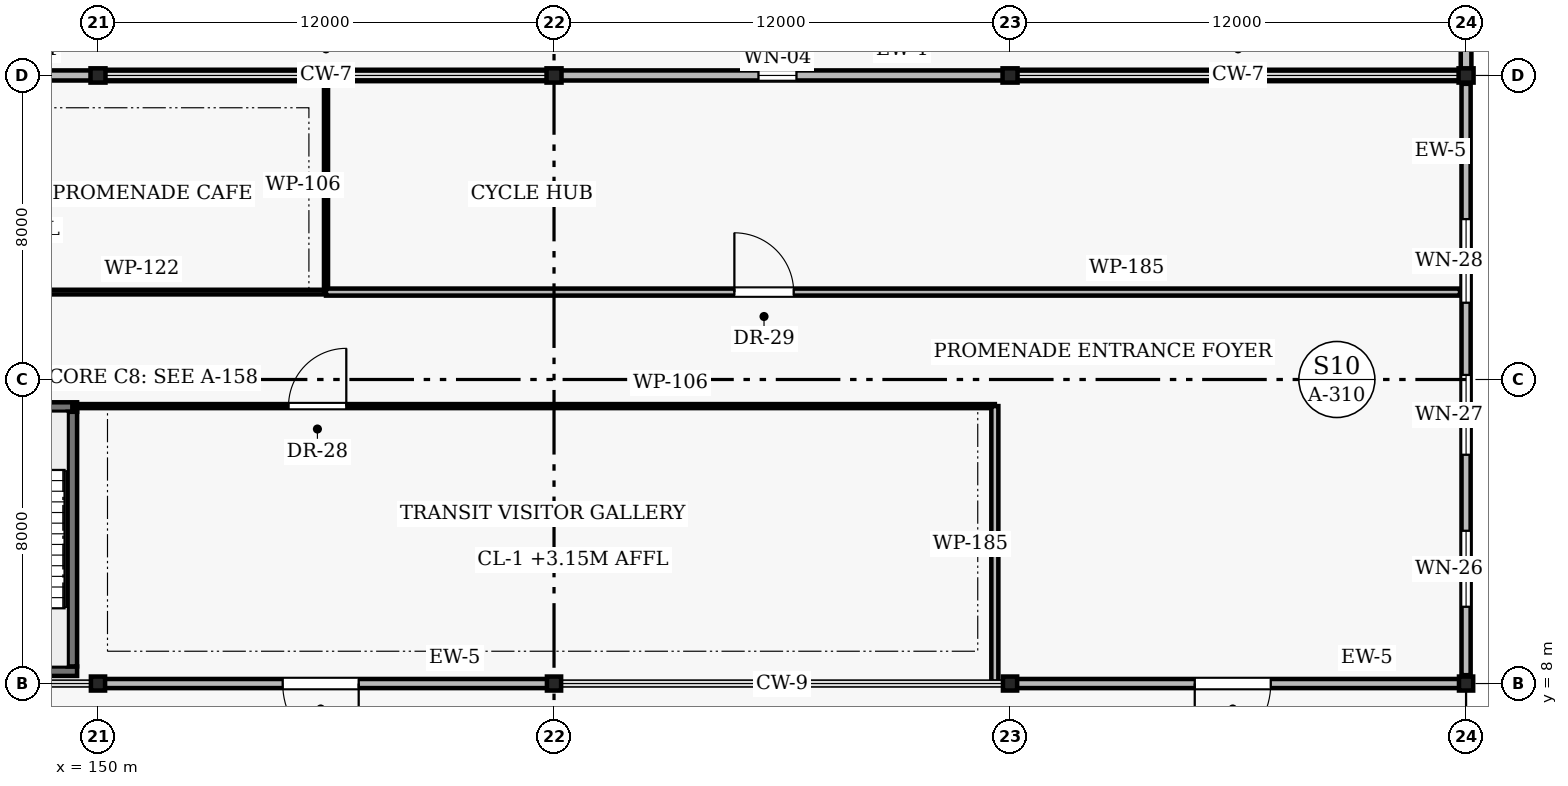
"""IFC4 building model, lengths in metres.
Left out: names, types, materials, properties, quantities, classifications, styles, units other than length and angle.
Written with IfcOpenShell. Run it as: python <this file> out.ifc"""

import sys

from ifc_helpers import new_model, si_unit, direction, frame, frame_2d, origin, origin_2d, place, context, subcontext, project, spatial, rectangle, i_section, extrude, element, fill, save


model = new_model("IFC4")
c1 = context("Model", 3, precision=1e-05, world=origin(), true_north=direction((0.0, 1.0)))
c2 = subcontext(c1, "Body", "Model", "MODEL_VIEW")
j1 = project(units=[si_unit("LENGTHUNIT", "METRE"), si_unit("PLANEANGLEUNIT", "RADIAN")], contexts=[c1])
p1 = place(None, origin())
s1 = spatial("IfcSite", under=j1, at=p1, CompositionType="ELEMENT")
p2 = place(p1, origin())
s2 = spatial("IfcBuilding", under=s1, at=p2, CompositionType="ELEMENT")
p3 = place(p2, origin())
s3 = spatial("IfcBuildingStorey", under=s2, at=p3, CompositionType="ELEMENT", Elevation=0.0)
p4 = place(p3, frame((150.0, 8.0, 0.0), z_axis=(0.0, 0.0, 1.0), x_axis=(1.0, 0.0, 0.0)))
e1 = element("IfcColumn", 1, at=p4, inside=s3, PredefinedType="COLUMN", context=c2, shape_type="SweptSolid", body=[
    extrude(i_section(OverallWidth=0.373, OverallDepth=0.368, WebThickness=0.015, FlangeThickness=0.024, FilletRadius=0.015, at=origin_2d()), origin(), (0.0, 0.0, 1.0), 4.5),
])
p5 = place(p3, frame((150.0, 24.0, 0.0), z_axis=(0.0, 0.0, 1.0), x_axis=(1.0, 0.0, 0.0)))
e2 = element("IfcColumn", 2, at=p5, inside=s3, PredefinedType="COLUMN", context=c2, shape_type="SweptSolid", body=[
    extrude(i_section(OverallWidth=0.394, OverallDepth=0.375, WebThickness=0.021, FlangeThickness=0.033, FilletRadius=0.018, at=origin_2d()), origin(), (0.0, 0.0, 1.0), 4.5),
])
p6 = place(p3, frame((162.0, 8.0, 0.0), z_axis=(0.0, 0.0, 1.0), x_axis=(1.0, 0.0, 0.0)))
e3 = element("IfcColumn", 3, at=p6, inside=s3, PredefinedType="COLUMN", context=c2, shape_type="SweptSolid", body=[
    extrude(i_section(OverallWidth=0.373, OverallDepth=0.368, WebThickness=0.015, FlangeThickness=0.024, FilletRadius=0.015, at=origin_2d()), origin(), (0.0, 0.0, 1.0), 4.5),
])
p7 = place(p3, frame((162.0, 24.0, 0.0), z_axis=(0.0, 0.0, 1.0), x_axis=(1.0, 0.0, 0.0)))
e4 = element("IfcColumn", 4, at=p7, inside=s3, PredefinedType="COLUMN", context=c2, shape_type="SweptSolid", body=[
    extrude(i_section(OverallWidth=0.394, OverallDepth=0.375, WebThickness=0.021, FlangeThickness=0.033, FilletRadius=0.018, at=origin_2d()), origin(), (0.0, 0.0, 1.0), 4.5),
])
p8 = place(p3, frame((174.0, 8.0, 0.0), z_axis=(0.0, 0.0, 1.0), x_axis=(1.0, 0.0, 0.0)))
e5 = element("IfcColumn", 5, at=p8, inside=s3, PredefinedType="COLUMN", context=c2, shape_type="SweptSolid", body=[
    extrude(i_section(OverallWidth=0.373, OverallDepth=0.368, WebThickness=0.015, FlangeThickness=0.024, FilletRadius=0.015, at=origin_2d()), origin(), (0.0, 0.0, 1.0), 4.5),
])
p9 = place(p3, frame((174.0, 24.0, 0.0), z_axis=(0.0, 0.0, 1.0), x_axis=(1.0, 0.0, 0.0)))
e6 = element("IfcColumn", 6, at=p9, inside=s3, PredefinedType="COLUMN", context=c2, shape_type="SweptSolid", body=[
    extrude(i_section(OverallWidth=0.394, OverallDepth=0.375, WebThickness=0.021, FlangeThickness=0.033, FilletRadius=0.018, at=origin_2d()), origin(), (0.0, 0.0, 1.0), 4.5),
])
p10 = place(p3, frame((186.0, 8.0, 0.0), z_axis=(0.0, 0.0, 1.0), x_axis=(1.0, 0.0, 0.0)))
e7 = element("IfcColumn", 7, at=p10, inside=s3, PredefinedType="COLUMN", context=c2, shape_type="SweptSolid", body=[
    extrude(i_section(OverallWidth=0.373, OverallDepth=0.368, WebThickness=0.015, FlangeThickness=0.024, FilletRadius=0.015, at=origin_2d()), origin(), (0.0, 0.0, 1.0), 4.5),
])
p11 = place(p3, frame((186.0, 24.0, 0.0), z_axis=(0.0, 0.0, 1.0), x_axis=(1.0, 0.0, 0.0)))
e8 = element("IfcColumn", 8, at=p11, inside=s3, PredefinedType="COLUMN", context=c2, shape_type="SweptSolid", body=[
    extrude(i_section(OverallWidth=0.394, OverallDepth=0.375, WebThickness=0.021, FlangeThickness=0.033, FilletRadius=0.018, at=origin_2d()), origin(), (0.0, 0.0, 1.0), 4.5),
])
p12 = place(p3, frame((142.58, 24.0, 0.0), z_axis=(0.0, 0.0, 1.0), x_axis=(1.0, 0.0, 0.0)))
e9 = element("IfcWall", 9, at=p12, inside=s3, PredefinedType="SOLIDWALL", context=c2, shape_type="SweptSolid", body=[
    extrude(rectangle(XDim=7.34, YDim=0.265, at=frame_2d((3.67, 0.0))), origin(), (0.0, 0.0, 1.0), 3.8),
])
p13 = place(p12, frame((3.05, 0.0, 1.2)))
e10 = element("IfcOpeningElement", 10, at=p13, cuts=e9, PredefinedType="OPENING", context=c2, shape_type="SweptSolid", body=[
    extrude(rectangle(XDim=1.0, YDim=1.2, at=frame_2d((0.5, 0.6))), frame((0.0, 0.142, 0.0), z_axis=(0.0, -1.0, 0.0), x_axis=(1.0, 0.0, 0.0)), (0.0, 0.0, 1.0), 0.285),
])
p14 = place(p3, frame((150.08, 24.0, 0.0), z_axis=(0.0, 0.0, 1.0), x_axis=(1.0, 0.0, 0.0)))
e11 = element("IfcWall", 11, at=p14, inside=s3, PredefinedType="SOLIDWALL", context=c2, shape_type="SweptSolid", body=[
    extrude(rectangle(XDim=11.84, YDim=0.3, at=frame_2d((5.92, 0.0))), origin(), (0.0, 0.0, 1.0), 1.1),
])
p15 = place(p3, frame((162.08, 24.0, 0.0), z_axis=(0.0, 0.0, 1.0), x_axis=(1.0, 0.0, 0.0)))
e12 = element("IfcWall", 12, at=p15, inside=s3, PredefinedType="SOLIDWALL", context=c2, shape_type="SweptSolid", body=[
    extrude(rectangle(XDim=11.84, YDim=0.265, at=frame_2d((5.92, 0.0))), origin(), (0.0, 0.0, 1.0), 3.8),
])
p16 = place(p15, frame((5.3, 0.0, 1.2)))
e13 = element("IfcOpeningElement", 13, at=p16, cuts=e12, PredefinedType="OPENING", context=c2, shape_type="SweptSolid", body=[
    extrude(rectangle(XDim=1.0, YDim=1.5, at=frame_2d((0.5, 0.75))), frame((0.0, 0.142, 0.0), z_axis=(0.0, -1.0, 0.0), x_axis=(1.0, 0.0, 0.0)), (0.0, 0.0, 1.0), 0.285),
])
p17 = place(p3, frame((174.08, 24.0, 0.0), z_axis=(0.0, 0.0, 1.0), x_axis=(1.0, 0.0, 0.0)))
e14 = element("IfcWall", 14, at=p17, inside=s3, PredefinedType="SOLIDWALL", context=c2, shape_type="SweptSolid", body=[
    extrude(rectangle(XDim=11.84, YDim=0.3, at=frame_2d((5.92, 0.0))), origin(), (0.0, 0.0, 1.0), 1.1),
])
p18 = place(p3, frame((186.0, 24.08, 0.0), z_axis=(0.0, 0.0, 1.0), x_axis=(0.0, 1.0, 0.0)))
e15 = element("IfcWall", 15, at=p18, inside=s3, PredefinedType="SOLIDWALL", context=c2, shape_type="SweptSolid", body=[
    extrude(rectangle(XDim=13.84, YDim=0.28, at=frame_2d((6.92, 0.0))), origin(), (0.0, 0.0, 1.0), 3.8),
])
p19 = place(p18, frame((4.8, 0.0, 0.0)))
e16 = element("IfcOpeningElement", 16, at=p19, cuts=e15, PredefinedType="OPENING", context=c2, shape_type="SweptSolid", body=[
    extrude(rectangle(XDim=3.4, YDim=3.25, at=frame_2d((1.7, 1.625))), frame((0.0, 0.15, 0.0), z_axis=(0.0, -1.0, 0.0), x_axis=(1.0, 0.0, 0.0)), (0.0, 0.0, 1.0), 0.3),
])
p20 = place(p3, frame((150.08, 8.0, 0.0), z_axis=(0.0, 0.0, 1.0), x_axis=(1.0, 0.0, 0.0)))
e17 = element("IfcWall", 17, at=p20, inside=s3, PredefinedType="SOLIDWALL", context=c2, shape_type="SweptSolid", body=[
    extrude(rectangle(XDim=11.84, YDim=0.24, at=frame_2d((5.92, 0.0))), origin(), (0.0, 0.0, 1.0), 3.75),
])
p21 = place(p20, frame((4.78, 0.0, 0.0)))
e18 = element("IfcOpeningElement", 18, at=p21, cuts=e17, PredefinedType="OPENING", context=c2, shape_type="SweptSolid", body=[
    extrude(rectangle(XDim=2.0, YDim=2.2, at=frame_2d((1.0, 1.1))), frame((0.0, 0.13, 0.0), z_axis=(0.0, -1.0, 0.0), x_axis=(1.0, 0.0, 0.0)), (0.0, 0.0, 1.0), 0.26),
])
p22 = place(p3, frame((174.08, 8.0, 0.0), z_axis=(0.0, 0.0, 1.0), x_axis=(1.0, 0.0, 0.0)))
e19 = element("IfcWall", 19, at=p22, inside=s3, PredefinedType="SOLIDWALL", context=c2, shape_type="SweptSolid", body=[
    extrude(rectangle(XDim=11.84, YDim=0.24, at=frame_2d((5.92, 0.0))), origin(), (0.0, 0.0, 1.0), 3.75),
])
p23 = place(p22, frame((4.78, 0.0, 0.0)))
e20 = element("IfcOpeningElement", 20, at=p23, cuts=e19, PredefinedType="OPENING", context=c2, shape_type="SweptSolid", body=[
    extrude(rectangle(XDim=2.0, YDim=2.2, at=frame_2d((1.0, 1.1))), frame((0.0, 0.13, 0.0), z_axis=(0.0, -1.0, 0.0), x_axis=(1.0, 0.0, 0.0)), (0.0, 0.0, 1.0), 0.26),
])
p24 = place(p3, frame((186.0, 8.22, 0.0), z_axis=(0.0, 0.0, 1.0), x_axis=(0.0, 1.0, 0.0)))
e21 = element("IfcWall", 21, at=p24, inside=s3, PredefinedType="SOLIDWALL", context=c2, shape_type="SweptSolid", body=[
    extrude(rectangle(XDim=15.56, YDim=0.24, at=frame_2d((7.78, 0.0))), origin(), (0.0, 0.0, 1.0), 3.581),
])
p25 = place(p24, frame((1.8, 0.0, 1.05)))
e22 = element("IfcOpeningElement", 22, at=p25, cuts=e21, PredefinedType="OPENING", context=c2, shape_type="SweptSolid", body=[
    extrude(rectangle(XDim=2.0, YDim=1.5, at=frame_2d((1.0, 0.75))), frame((0.0, 0.13, 0.0), z_axis=(0.0, -1.0, 0.0), x_axis=(1.0, 0.0, 0.0)), (0.0, 0.0, 1.0), 0.26),
])
p26 = place(p24, frame((5.8, 0.0, 1.05)))
e23 = element("IfcOpeningElement", 23, at=p26, cuts=e21, PredefinedType="OPENING", context=c2, shape_type="SweptSolid", body=[
    extrude(rectangle(XDim=2.1, YDim=1.5, at=frame_2d((1.05, 0.75))), frame((0.0, 0.13, 0.0), z_axis=(0.0, -1.0, 0.0), x_axis=(1.0, 0.0, 0.0)), (0.0, 0.0, 1.0), 0.26),
])
p27 = place(p24, frame((9.8, 0.0, 1.05)))
e24 = element("IfcOpeningElement", 24, at=p27, cuts=e21, PredefinedType="OPENING", context=c2, shape_type="SweptSolid", body=[
    extrude(rectangle(XDim=2.2, YDim=1.6, at=frame_2d((1.1, 0.8))), frame((0.0, 0.13, 0.0), z_axis=(0.0, -1.0, 0.0), x_axis=(1.0, 0.0, 0.0)), (0.0, 0.0, 1.0), 0.26),
])
p28 = place(p3, frame((143.05, 8.325, 0.0), z_axis=(0.0, 0.0, 1.0), x_axis=(1.0, 0.0, 0.0)))
e25 = element("IfcWall", 25, at=p28, inside=s3, PredefinedType="SHEAR", context=c2, shape_type="SweptSolid", body=[
    extrude(rectangle(XDim=6.4, YDim=0.25, at=frame_2d((3.2, 0.0))), origin(), (0.0, 0.0, 1.0), 4.5),
])
p29 = place(p3, frame((143.05, 15.275, 0.0), z_axis=(0.0, 0.0, 1.0), x_axis=(1.0, 0.0, 0.0)))
e26 = element("IfcWall", 26, at=p29, inside=s3, PredefinedType="SHEAR", context=c2, shape_type="SweptSolid", body=[
    extrude(rectangle(XDim=6.4, YDim=0.25, at=frame_2d((3.2, 0.0))), origin(), (0.0, 0.0, 1.0), 4.5),
])
p30 = place(p29, frame((0.8, 0.0, 0.0)))
e27 = element("IfcOpeningElement", 27, at=p30, cuts=e26, PredefinedType="OPENING", context=c2, shape_type="SweptSolid", body=[
    extrude(rectangle(XDim=1.1, YDim=2.15, at=frame_2d((0.55, 1.075))), frame((0.0, 0.135, 0.0), z_axis=(0.0, -1.0, 0.0), x_axis=(1.0, 0.0, 0.0)), (0.0, 0.0, 1.0), 0.27),
])
p31 = place(p29, frame((3.775, 0.0, 0.0)))
e28 = element("IfcOpeningElement", 28, at=p31, cuts=e26, PredefinedType="OPENING", context=c2, shape_type="SweptSolid", body=[
    extrude(rectangle(XDim=1.25, YDim=2.15, at=frame_2d((0.625, 1.075))), frame((0.0, 0.135, 0.0), z_axis=(0.0, -1.0, 0.0), x_axis=(1.0, 0.0, 0.0)), (0.0, 0.0, 1.0), 0.27),
])
p32 = place(p3, frame((149.325, 8.45, 0.0), z_axis=(0.0, 0.0, 1.0), x_axis=(0.0, 1.0, 0.0)))
e29 = element("IfcWall", 29, at=p32, inside=s3, PredefinedType="SHEAR", context=c2, shape_type="SweptSolid", body=[
    extrude(rectangle(XDim=6.7, YDim=0.25, at=frame_2d((3.35, 0.0))), origin(), (0.0, 0.0, 1.0), 4.5),
])
p33 = place(p3, frame((135.16, 18.3, 0.0), z_axis=(0.0, 0.0, 1.0), x_axis=(1.0, 0.0, 0.0)))
e30 = element("IfcWall", 30, at=p33, inside=s3, PredefinedType="PARTITIONING", context=c2, shape_type="SweptSolid", body=[
    extrude(rectangle(XDim=20.84, YDim=0.122, at=frame_2d((10.42, 0.0))), origin(), (0.0, 0.0, 1.0), 3.7),
])
p34 = place(p33, frame((9.69, 0.0, 0.0)))
e31 = element("IfcOpeningElement", 31, at=p34, cuts=e30, PredefinedType="OPENING", context=c2, shape_type="SweptSolid", body=[
    extrude(rectangle(XDim=1.46, YDim=2.2, at=frame_2d((0.73, 1.1))), frame((0.0, 0.071, 0.0), z_axis=(0.0, -1.0, 0.0), x_axis=(1.0, 0.0, 0.0)), (0.0, 0.0, 1.0), 0.142),
])
p35 = place(p3, frame((156.0, 18.3, 0.0), z_axis=(0.0, 0.0, 1.0), x_axis=(0.0, 1.0, 0.0)))
e32 = element("IfcWall", 32, at=p35, inside=s3, PredefinedType="PARTITIONING", context=c2, shape_type="SweptSolid", body=[
    extrude(rectangle(XDim=5.62, YDim=0.106, at=frame_2d((2.81, 0.0))), origin(), (0.0, 0.0, 1.0), 3.7),
])
p36 = place(p3, frame((149.325, 15.3, 0.0), z_axis=(0.0, 0.0, 1.0), x_axis=(1.0, 0.0, 0.0)))
e33 = element("IfcWall", 33, at=p36, inside=s3, PredefinedType="PARTITIONING", context=c2, shape_type="SweptSolid", body=[
    extrude(rectangle(XDim=24.275, YDim=0.106, at=frame_2d((12.138, 0.0))), origin(), (0.0, 0.0, 1.0), 3.7),
])
p37 = place(p36, frame((5.689, 0.0, 0.0)))
e34 = element("IfcOpeningElement", 34, at=p37, cuts=e33, PredefinedType="OPENING", context=c2, shape_type="SweptSolid", body=[
    extrude(rectangle(XDim=1.52, YDim=2.18, at=frame_2d((0.76, 1.09))), frame((0.0, 0.063, 0.0), z_axis=(0.0, -1.0, 0.0), x_axis=(1.0, 0.0, 0.0)), (0.0, 0.0, 1.0), 0.126),
])
p38 = place(p3, frame((173.6, 8.05, 0.0), z_axis=(0.0, 0.0, 1.0), x_axis=(0.0, 1.0, 0.0)))
e35 = element("IfcWall", 35, at=p38, inside=s3, PredefinedType="PARTITIONING", context=c2, shape_type="SweptSolid", body=[
    extrude(rectangle(XDim=7.25, YDim=0.185, at=frame_2d((3.625, 0.0))), origin(), (0.0, 0.0, 1.0), 3.581),
])
p39 = place(p3, frame((156.0, 18.3, 0.0), z_axis=(0.0, 0.0, 1.0), x_axis=(1.0, 0.0, 0.0)))
e36 = element("IfcWall", 36, at=p39, inside=s3, PredefinedType="PARTITIONING", context=c2, shape_type="SweptSolid", body=[
    extrude(rectangle(XDim=29.84, YDim=0.185, at=frame_2d((14.92, 0.0))), origin(), (0.0, 0.0, 1.0), 3.7),
])
p40 = place(p39, frame((10.746, 0.0, 0.0)))
e37 = element("IfcOpeningElement", 37, at=p40, cuts=e36, PredefinedType="OPENING", context=c2, shape_type="SweptSolid", body=[
    extrude(rectangle(XDim=1.56, YDim=2.2, at=frame_2d((0.78, 1.1))), frame((0.0, 0.103, 0.0), z_axis=(0.0, -1.0, 0.0), x_axis=(1.0, 0.0, 0.0)), (0.0, 0.0, 1.0), 0.205),
])
p41 = place(p16, origin())
e38 = element("IfcWindow", 38, at=p41, inside=s3, PartitioningType="SINGLE_PANEL", PredefinedType="WINDOW", context=c2, shape_type="SweptSolid", body=[
    extrude(rectangle(XDim=1.0, YDim=1.5, at=frame_2d((0.5, 0.75))), frame((0.0, 0.03, 0.0), z_axis=(0.0, -1.0, 0.0), x_axis=(1.0, 0.0, 0.0)), (0.0, 0.0, 1.0), 0.06),
])
fill(e13, e38)
p42 = place(p21, frame((2.0, 0.0, 0.0), z_axis=(0.0, 0.0, 1.0), x_axis=(-1.0, 0.0, 0.0)))
e39 = element("IfcDoor", 39, at=p42, inside=s3, OperationType="SINGLE_SWING_LEFT", PredefinedType="DOOR", context=c2, shape_type="SweptSolid", body=[
    extrude(rectangle(XDim=2.0, YDim=2.2, at=frame_2d((1.0, 1.1))), frame((0.0, 0.025, 0.0), z_axis=(0.0, -1.0, 0.0), x_axis=(1.0, 0.0, 0.0)), (0.0, 0.0, 1.0), 0.05),
])
fill(e18, e39)
p43 = place(p23, frame((2.0, 0.0, 0.0), z_axis=(0.0, 0.0, 1.0), x_axis=(-1.0, 0.0, 0.0)))
e40 = element("IfcDoor", 40, at=p43, inside=s3, OperationType="SINGLE_SWING_RIGHT", PredefinedType="DOOR", context=c2, shape_type="SweptSolid", body=[
    extrude(rectangle(XDim=2.0, YDim=2.2, at=frame_2d((1.0, 1.1))), frame((0.0, 0.025, 0.0), z_axis=(0.0, -1.0, 0.0), x_axis=(1.0, 0.0, 0.0)), (0.0, 0.0, 1.0), 0.05),
])
fill(e20, e40)
p44 = place(p25, origin())
e41 = element("IfcWindow", 41, at=p44, inside=s3, PartitioningType="SINGLE_PANEL", PredefinedType="WINDOW", context=c2, shape_type="SweptSolid", body=[
    extrude(rectangle(XDim=2.0, YDim=1.5, at=frame_2d((1.0, 0.75))), frame((0.0, 0.03, 0.0), z_axis=(0.0, -1.0, 0.0), x_axis=(1.0, 0.0, 0.0)), (0.0, 0.0, 1.0), 0.06),
])
fill(e22, e41)
p45 = place(p26, origin())
e42 = element("IfcWindow", 42, at=p45, inside=s3, PartitioningType="SINGLE_PANEL", PredefinedType="WINDOW", context=c2, shape_type="SweptSolid", body=[
    extrude(rectangle(XDim=2.1, YDim=1.5, at=frame_2d((1.05, 0.75))), frame((0.0, 0.03, 0.0), z_axis=(0.0, -1.0, 0.0), x_axis=(1.0, 0.0, 0.0)), (0.0, 0.0, 1.0), 0.06),
])
fill(e23, e42)
p46 = place(p27, origin())
e43 = element("IfcWindow", 43, at=p46, inside=s3, PartitioningType="SINGLE_PANEL", PredefinedType="WINDOW", context=c2, shape_type="SweptSolid", body=[
    extrude(rectangle(XDim=2.2, YDim=1.6, at=frame_2d((1.1, 0.8))), frame((0.0, 0.03, 0.0), z_axis=(0.0, -1.0, 0.0), x_axis=(1.0, 0.0, 0.0)), (0.0, 0.0, 1.0), 0.06),
])
fill(e24, e43)
p47 = place(p37, origin())
e44 = element("IfcDoor", 44, at=p47, inside=s3, OperationType="SINGLE_SWING_RIGHT", PredefinedType="DOOR", context=c2, shape_type="SweptSolid", body=[
    extrude(rectangle(XDim=1.52, YDim=2.18, at=frame_2d((0.76, 1.09))), frame((0.0, 0.025, 0.0), z_axis=(0.0, -1.0, 0.0), x_axis=(1.0, 0.0, 0.0)), (0.0, 0.0, 1.0), 0.05),
])
fill(e34, e44)
p48 = place(p40, origin())
e45 = element("IfcDoor", 45, at=p48, inside=s3, OperationType="SINGLE_SWING_LEFT", PredefinedType="DOOR", context=c2, shape_type="SweptSolid", body=[
    extrude(rectangle(XDim=1.56, YDim=2.2, at=frame_2d((0.78, 1.1))), frame((0.0, 0.025, 0.0), z_axis=(0.0, -1.0, 0.0), x_axis=(1.0, 0.0, 0.0)), (0.0, 0.0, 1.0), 0.05),
])
fill(e37, e45)
save(model, sys.argv[1])
